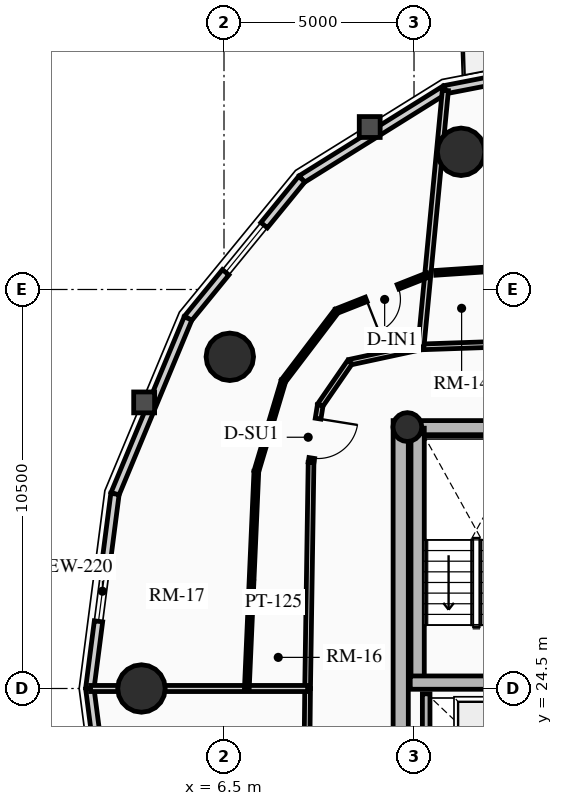
"""IFC4 building model, lengths in metres.
Left out: names, types, materials, properties, quantities, classifications, styles, units other than length and angle.
Written with IfcOpenShell. Run it as: python <this file> out.ifc"""

import sys

from ifc_helpers import new_model, si_unit, direction, frame, frame_2d, origin, origin_2d, place, context, subcontext, project, spatial, rectangle, circle, hollow_circle, extrude, source, transform, mapped, element, fill, save


model = new_model("IFC4")
c1 = context("Model", 3, precision=1e-05, world=origin(), true_north=direction((0.0, 1.0)))
c2 = subcontext(c1, "Body", "Model", "MODEL_VIEW")
j1 = project(units=[si_unit("LENGTHUNIT", "METRE"), si_unit("PLANEANGLEUNIT", "RADIAN")], contexts=[c1])
p1 = place(None, origin())
s1 = spatial("IfcSite", under=j1, at=p1, CompositionType="ELEMENT")
p2 = place(p1, origin())
s2 = spatial("IfcBuilding", under=s1, at=p2, CompositionType="ELEMENT")
p3 = place(p2, frame((0.0, 0.0, 180.7)))
s3 = spatial("IfcBuildingStorey", under=s2, at=p3, CompositionType="ELEMENT", Elevation=180.7)
p4 = place(p3, frame((11.15, 17.45, 0.0), z_axis=(0.0, 0.0, 1.0), x_axis=(0.0, 1.0, 0.0)))
e1 = element("IfcWall", 1, at=p4, inside=s3, PredefinedType="SHEAR", context=c2, shape_type="SweptSolid", body=[
    extrude(rectangle(XDim=14.1, YDim=0.4, at=frame_2d((7.05, 0.0))), origin(), (0.0, 0.0, 1.0), 2.91),
])
p5 = place(p3, frame((11.15, 31.35, 0.0), z_axis=(0.0, 0.0, 1.0), x_axis=(1.0, 0.0, 0.0)))
e2 = element("IfcWall", 2, at=p5, inside=s3, PredefinedType="SHEAR", context=c2, shape_type="SweptSolid", body=[
    extrude(rectangle(XDim=10.7, YDim=0.4, at=frame_2d((5.35, 0.0))), origin(), (0.0, 0.0, 1.0), 2.91),
])
m1 = source(origin(), c2, "Body", "SweptSolid", [
    extrude(rectangle(XDim=1.5, YDim=2.02, at=frame_2d((0.75, 1.01))), frame((0.0, 0.21, 0.0), z_axis=(0.0, -1.0, 0.0), x_axis=(1.0, 0.0, 0.0)), (0.0, 0.0, 1.0), 0.42),
])
p6 = place(p5, frame((4.6, 0.0, 0.0)))
e3 = element("IfcOpeningElement", 3, at=p6, cuts=e2, PredefinedType="OPENING", context=c2, shape_type="MappedRepresentation", body=[
    mapped(m1, transform((0.0, 0.0, 0.0), x_axis=(1.0, 0.0, 0.0), y_axis=(0.0, 1.0, 0.0), z_axis=(0.0, 0.0, 1.0), scale=1.0)),
])
p7 = place(p3, frame((11.595, 24.655, 0.0), z_axis=(0.0, 0.0, 1.0), x_axis=(0.0, 1.0, 0.0)))
e4 = element("IfcWall", 4, at=p7, inside=s3, PredefinedType="SHEAR", context=c2, shape_type="SweptSolid", body=[
    extrude(rectangle(XDim=6.695, YDim=0.35, at=frame_2d((3.348, 0.0))), origin(), (0.0, 0.0, 1.0), 2.91),
])
p8 = place(p3, frame((11.4, 24.655, 0.0), z_axis=(0.0, 0.0, 1.0), x_axis=(1.0, 0.0, 0.0)))
e5 = element("IfcWall", 5, at=p8, inside=s3, PredefinedType="SHEAR", context=c2, shape_type="SweptSolid", body=[
    extrude(rectangle(XDim=3.285, YDim=0.35, at=frame_2d((1.643, 0.0))), origin(), (0.0, 0.0, 1.0), 2.91),
])
p9 = place(p3, frame((11.325, 31.38, 0.0), z_axis=(0.0, 0.0, 1.0), x_axis=(1.0, 0.0, 0.0)))
e6 = element("IfcColumn", 6, at=p9, inside=s3, PredefinedType="COLUMN", context=c2, shape_type="SweptSolid", body=[
    extrude(hollow_circle(Radius=0.38, WallThickness=0.032, at=origin_2d()), origin(), (0.0, 0.0, 1.0), 2.91),
])
for number, where, z_axis, x_axis in (
    (7, (12.739, 38.623, 0.0), (0.0, 0.0, 1.0), (1.0, 0.0, 0.0)),
    (8, (6.653, 33.229, 0.0), (0.0, 0.0, 1.0), (1.0, 0.0, 0.0)),
    (9, (4.328, 24.5, 0.0), (0.0, 0.0, 1.0), (1.0, 0.0, 0.0)),
):
    element("IfcColumn", number, at=place(p3, frame(where, z_axis=z_axis, x_axis=x_axis)), inside=s3, PredefinedType="USERDEFINED", context=c2, shape_type="SweptSolid", body=[
        extrude(circle(Radius=0.625, at=origin_2d()), origin(), (0.0, 0.0, 1.0), 2.91),
    ])
p10 = place(p3, frame((12.319, 40.259, 0.0), z_axis=(0.0, 0.0, 1.0), x_axis=(0.981703883443, 0.190413983815, 0.0)))
e10 = element("IfcWall", 10, at=p10, inside=s3, PredefinedType="SOLIDWALL", context=c2, shape_type="SweptSolid", body=[
    extrude(rectangle(XDim=4.259, YDim=0.22, at=frame_2d((2.13, 0.0))), origin(), (0.0, 0.0, 1.0), 2.245),
])
m2 = source(origin(), c2, "Body", "SweptSolid", [
    extrude(rectangle(XDim=1.15, YDim=2.005, at=frame_2d((0.575, 1.002))), frame((0.0, 0.12, 0.0), z_axis=(0.0, -1.0, 0.0), x_axis=(1.0, 0.0, 0.0)), (0.0, 0.0, 1.0), 0.24),
])
p11 = place(p10, frame((1.555, 0.0, 0.0)))
e11 = element("IfcOpeningElement", 11, at=p11, cuts=e10, PredefinedType="OPENING", context=c2, shape_type="MappedRepresentation", body=[
    mapped(m2, transform((0.0, 0.0, 0.0), x_axis=(1.0, 0.0, 0.0), y_axis=(0.0, 1.0, 0.0), z_axis=(0.0, 0.0, 1.0), scale=1.0)),
])
p12 = place(p3, frame((8.547, 37.906, 0.0), z_axis=(0.0, 0.0, 1.0), x_axis=(0.848399108042, 0.529357113368, 0.0)))
e12 = element("IfcWall", 12, at=p12, inside=s3, PredefinedType="SOLIDWALL", context=c2, shape_type="SweptSolid", body=[
    extrude(rectangle(XDim=4.446, YDim=0.22, at=frame_2d((2.223, 0.0))), origin(), (0.0, 0.0, 1.0), 2.245),
])
p13 = place(p3, frame((5.553, 34.24, 0.0), z_axis=(0.0, 0.0, 1.0), x_axis=(0.632470615287, 0.774584353572, 0.0)))
e13 = element("IfcWall", 13, at=p13, inside=s3, PredefinedType="SOLIDWALL", context=c2, shape_type="SweptSolid", body=[
    extrude(rectangle(XDim=4.733, YDim=0.22, at=frame_2d((2.366, 0.0))), origin(), (0.0, 0.0, 1.0), 2.245),
])
m3 = source(origin(), c2, "Body", "SweptSolid", [
    extrude(rectangle(XDim=1.6, YDim=1.3, at=frame_2d((0.8, 0.65))), frame((0.0, 0.12, 0.0), z_axis=(0.0, -1.0, 0.0), x_axis=(1.0, 0.0, 0.0)), (0.0, 0.0, 1.0), 0.24),
])
p14 = place(p13, frame((1.566, 0.0, 0.65)))
e14 = element("IfcOpeningElement", 14, at=p14, cuts=e13, PredefinedType="OPENING", context=c2, shape_type="MappedRepresentation", body=[
    mapped(m3, transform((0.0, 0.0, 0.0), x_axis=(1.0, 0.0, 0.0), y_axis=(0.0, 1.0, 0.0), z_axis=(0.0, 0.0, 1.0), scale=1.0)),
])
p15 = place(p3, frame((3.631, 29.62, 0.0), z_axis=(0.0, 0.0, 1.0), x_axis=(0.384144094086, 0.923273152961, 0.0)))
e15 = element("IfcWall", 15, at=p15, inside=s3, PredefinedType="SOLIDWALL", context=c2, shape_type="SweptSolid", body=[
    extrude(rectangle(XDim=5.003, YDim=0.22, at=frame_2d((2.501, 0.0))), origin(), (0.0, 0.0, 1.0), 2.245),
])
p16 = place(p3, frame((2.969, 24.5, 0.0), z_axis=(0.0, 0.0, 1.0), x_axis=(0.128287912609, 0.991736966881, 0.0)))
e16 = element("IfcWall", 16, at=p16, inside=s3, PredefinedType="SOLIDWALL", context=c2, shape_type="SweptSolid", body=[
    extrude(rectangle(XDim=5.163, YDim=0.22, at=frame_2d((2.582, 0.0))), origin(), (0.0, 0.0, 1.0), 2.245),
])
p17 = place(p16, frame((1.782, 0.0, 0.65)))
e17 = element("IfcOpeningElement", 17, at=p17, cuts=e16, PredefinedType="OPENING", context=c2, shape_type="MappedRepresentation", body=[
    mapped(m3, transform((0.0, 0.0, 0.0), x_axis=(1.0, 0.0, 0.0), y_axis=(0.0, 1.0, 0.0), z_axis=(0.0, 0.0, 1.0), scale=1.0)),
])
p18 = place(p3, frame((3.631, 19.38, 0.0), z_axis=(0.0, 0.0, 1.0), x_axis=(-0.128287912609, 0.991736966881, 0.0)))
e18 = element("IfcWall", 18, at=p18, inside=s3, PredefinedType="SOLIDWALL", context=c2, shape_type="SweptSolid", body=[
    extrude(rectangle(XDim=5.163, YDim=0.22, at=frame_2d((2.582, 0.0))), origin(), (0.0, 0.0, 1.0), 2.245),
])
p19 = place(p3, frame((11.82, 21.92, 0.0), z_axis=(0.0, 0.0, 1.0), x_axis=(0.0, 1.0, 0.0)))
e19 = element("IfcWall", 19, at=p19, inside=s3, PredefinedType="SHEAR", context=c2, shape_type="SweptSolid", body=[
    extrude(rectangle(XDim=2.44, YDim=0.2, at=frame_2d((1.22, 0.0))), origin(), (0.0, 0.0, 1.0), 2.91),
])
p20 = place(p3, frame((18.123, 33.709, 0.0), z_axis=(0.0, 0.0, 1.0), x_axis=(-0.999417459976, -0.034128297572, 0.0)))
e20 = element("IfcWall", 20, at=p20, inside=s3, PredefinedType="PARTITIONING", context=c2, shape_type="SweptSolid", body=[
    extrude(rectangle(XDim=6.445, YDim=0.15, at=frame_2d((3.223, 0.0))), origin(), (0.0, 0.0, 1.0), 2.245),
])
p21 = place(p3, frame((11.681, 33.49, 0.0), z_axis=(0.0, 0.0, 1.0), x_axis=(-0.977628265995, -0.2103401377, 0.0)))
e21 = element("IfcWall", 21, at=p21, inside=s3, PredefinedType="PARTITIONING", context=c2, shape_type="SweptSolid", body=[
    extrude(rectangle(XDim=1.912, YDim=0.15, at=frame_2d((0.956, 0.0))), origin(), (0.0, 0.0, 1.0), 2.245),
])
p22 = place(p3, frame((9.812, 33.087, 0.0), z_axis=(0.0, 0.0, 1.0), x_axis=(-0.567811958729, -0.823158295545, 0.0)))
e22 = element("IfcWall", 22, at=p22, inside=s3, PredefinedType="PARTITIONING", context=c2, shape_type="SweptSolid", body=[
    extrude(rectangle(XDim=1.372, YDim=0.15, at=frame_2d((0.686, 0.0))), origin(), (0.0, 0.0, 1.0), 2.245),
])
p23 = place(p3, frame((9.033, 31.958, 0.0), z_axis=(0.0, 0.0, 1.0), x_axis=(-0.158344987388, -0.98738384885, 0.0)))
e23 = element("IfcWall", 23, at=p23, inside=s3, PredefinedType="PARTITIONING", context=c2, shape_type="SweptSolid", body=[
    extrude(rectangle(XDim=1.531, YDim=0.15, at=frame_2d((0.766, 0.0))), origin(), (0.0, 0.0, 1.0), 2.245),
])
m4 = source(origin(), c2, "Body", "SweptSolid", [
    extrude(rectangle(XDim=1.05, YDim=2.015, at=frame_2d((0.525, 1.007))), frame((0.0, 0.085, 0.0), z_axis=(0.0, -1.0, 0.0), x_axis=(1.0, 0.0, 0.0)), (0.0, 0.0, 1.0), 0.17),
])
p24 = place(p23, frame((0.361, 0.0, 0.0)))
e24 = element("IfcOpeningElement", 24, at=p24, cuts=e23, PredefinedType="OPENING", context=c2, shape_type="MappedRepresentation", body=[
    mapped(m4, transform((0.0, 0.0, 0.0), x_axis=(1.0, 0.0, 0.0), y_axis=(0.0, 1.0, 0.0), z_axis=(0.0, 0.0, 1.0), scale=1.0)),
])
p25 = place(p3, frame((8.791, 30.446, 0.0), z_axis=(0.0, 0.0, 1.0), x_axis=(-0.015230619426, -0.999884007389, 0.0)))
e25 = element("IfcWall", 25, at=p25, inside=s3, PredefinedType="PARTITIONING", context=c2, shape_type="SweptSolid", body=[
    extrude(rectangle(XDim=5.947, YDim=0.15, at=frame_2d((2.974, 0.0))), origin(), (0.0, 0.0, 1.0), 2.675),
])
p26 = place(p3, frame((8.7, 24.5, 0.0), z_axis=(0.0, 0.0, 1.0), x_axis=(-0.010507512335, -0.999944794568, 0.0)))
e26 = element("IfcWall", 26, at=p26, inside=s3, PredefinedType="PARTITIONING", context=c2, shape_type="SweptSolid", body=[
    extrude(rectangle(XDim=6.064, YDim=0.15, at=frame_2d((3.032, 0.0))), origin(), (0.0, 0.0, 1.0), 2.245),
])
p27 = place(p3, frame((11.681, 33.49, 0.0), z_axis=(0.0, 0.0, 1.0), x_axis=(0.094975594504, 0.995479601222, 0.0)))
e27 = element("IfcWall", 27, at=p27, inside=s3, PredefinedType="PARTITIONING", context=c2, shape_type="SweptSolid", body=[
    extrude(rectangle(XDim=6.781, YDim=0.16, at=frame_2d((3.391, 0.0))), origin(), (0.0, 0.0, 1.0), 2.245),
])
p28 = place(p3, frame((8.7, 24.5, 0.0), z_axis=(0.0, 0.0, 1.0), x_axis=(-1.0, 0.0, 0.0)))
e28 = element("IfcWall", 28, at=p28, inside=s3, PredefinedType="PARTITIONING", context=c2, shape_type="SweptSolid", body=[
    extrude(rectangle(XDim=5.711, YDim=0.16, at=frame_2d((2.855, 0.0))), origin(), (0.0, 0.0, 1.0), 2.245),
])
p29 = place(p3, frame((14.848, 35.625, 0.0), z_axis=(0.0, 0.0, 1.0), x_axis=(-0.997750908336, -0.067030775874, 0.0)))
e29 = element("IfcWall", 29, at=p29, inside=s3, PredefinedType="PARTITIONING", context=c2, shape_type="SweptSolid", body=[
    extrude(rectangle(XDim=2.786, YDim=0.125, at=frame_2d((1.393, 0.0))), origin(), (0.0, 0.0, 1.0), 2.245),
])
m5 = source(origin(), c2, "Body", "SweptSolid", [
    extrude(rectangle(XDim=0.9, YDim=2.005, at=frame_2d((0.45, 1.002))), frame((0.0, 0.073, 0.0), z_axis=(0.0, -1.0, 0.0), x_axis=(1.0, 0.0, 0.0)), (0.0, 0.0, 1.0), 0.145),
])
p30 = place(p29, frame((0.12, 0.0, 0.0)))
e30 = element("IfcOpeningElement", 30, at=p30, cuts=e29, PredefinedType="OPENING", context=c2, shape_type="MappedRepresentation", body=[
    mapped(m5, transform((0.0, 0.0, 0.0), x_axis=(1.0, 0.0, 0.0), y_axis=(0.0, 1.0, 0.0), z_axis=(0.0, 0.0, 1.0), scale=1.0)),
])
p31 = place(p3, frame((11.861, 35.38, 0.0), z_axis=(0.0, 0.0, 1.0), x_axis=(-0.930124609977, -0.367244074037, 0.0)))
e31 = element("IfcWall", 31, at=p31, inside=s3, PredefinedType="PARTITIONING", context=c2, shape_type="SweptSolid", body=[
    extrude(rectangle(XDim=2.581, YDim=0.125, at=frame_2d((1.291, 0.0))), origin(), (0.0, 0.0, 1.0), 2.245),
])
p32 = place(p31, frame((0.84, 0.0, 0.0)))
e32 = element("IfcOpeningElement", 32, at=p32, cuts=e31, PredefinedType="OPENING", context=c2, shape_type="MappedRepresentation", body=[
    mapped(m5, transform((0.0, 0.0, 0.0), x_axis=(1.0, 0.0, 0.0), y_axis=(0.0, 1.0, 0.0), z_axis=(0.0, 0.0, 1.0), scale=1.0)),
])
p33 = place(p3, frame((9.461, 34.432, 0.0), z_axis=(0.0, 0.0, 1.0), x_axis=(-0.605297668278, -0.795999204005, 0.0)))
e33 = element("IfcWall", 33, at=p33, inside=s3, PredefinedType="PARTITIONING", context=c2, shape_type="SweptSolid", body=[
    extrude(rectangle(XDim=2.31, YDim=0.125, at=frame_2d((1.155, 0.0))), origin(), (0.0, 0.0, 1.0), 2.245),
])
p34 = place(p3, frame((8.063, 32.594, 0.0), z_axis=(0.0, 0.0, 1.0), x_axis=(-0.286473203627, -0.958088254601, 0.0)))
e34 = element("IfcWall", 34, at=p34, inside=s3, PredefinedType="PARTITIONING", context=c2, shape_type="SweptSolid", body=[
    extrude(rectangle(XDim=2.484, YDim=0.125, at=frame_2d((1.242, 0.0))), origin(), (0.0, 0.0, 1.0), 2.245),
])
p35 = place(p3, frame((7.351, 30.213, 0.0), z_axis=(0.0, 0.0, 1.0), x_axis=(-0.043800331293, -0.999040304982, 0.0)))
e35 = element("IfcWall", 35, at=p35, inside=s3, PredefinedType="PARTITIONING", context=c2, shape_type="SweptSolid", body=[
    extrude(rectangle(XDim=5.719, YDim=0.125, at=frame_2d((2.859, 0.0))), origin(), (0.0, 0.0, 1.0), 2.675),
])
m6 = source(origin(), c2, "Body", "SweptSolid", [
    extrude(rectangle(XDim=1.6, YDim=1.3, at=frame_2d((0.8, 0.65))), frame((0.0, 0.03, 0.0), z_axis=(0.0, -1.0, 0.0), x_axis=(1.0, 0.0, 0.0)), (0.0, 0.0, 1.0), 0.06),
])
p36 = place(p14, origin())
e36 = element("IfcWindow", 36, at=p36, inside=s3, PartitioningType="SINGLE_PANEL", PredefinedType="WINDOW", context=c2, shape_type="MappedRepresentation", body=[
    mapped(m6, transform((0.0, 0.0, 0.0), x_axis=(1.0, 0.0, 0.0), y_axis=(0.0, 1.0, 0.0), z_axis=(0.0, 0.0, 1.0), scale=1.0)),
])
fill(e14, e36)
p37 = place(p17, origin())
e37 = element("IfcWindow", 37, at=p37, inside=s3, PartitioningType="SINGLE_PANEL", PredefinedType="WINDOW", context=c2, shape_type="MappedRepresentation", body=[
    mapped(m6, transform((0.0, 0.0, 0.0), x_axis=(1.0, 0.0, 0.0), y_axis=(0.0, 1.0, 0.0), z_axis=(0.0, 0.0, 1.0), scale=1.0)),
])
fill(e17, e37)
m7 = source(origin(), c2, "Body", "SweptSolid", [
    extrude(rectangle(XDim=1.05, YDim=2.015, at=frame_2d((0.525, 1.007))), frame((0.0, 0.025, 0.0), z_axis=(0.0, -1.0, 0.0), x_axis=(1.0, 0.0, 0.0)), (0.0, 0.0, 1.0), 0.05),
])
p38 = place(p24, origin())
e38 = element("IfcDoor", 38, at=p38, inside=s3, OperationType="SINGLE_SWING_LEFT", PredefinedType="DOOR", context=c2, shape_type="MappedRepresentation", body=[
    mapped(m7, transform((0.0, 0.0, 0.0), x_axis=(1.0, 0.0, 0.0), y_axis=(0.0, 1.0, 0.0), z_axis=(0.0, 0.0, 1.0), scale=1.0)),
])
fill(e24, e38)
m8 = source(origin(), c2, "Body", "SweptSolid", [
    extrude(rectangle(XDim=0.9, YDim=2.005, at=frame_2d((0.45, 1.002))), frame((0.0, 0.025, 0.0), z_axis=(0.0, -1.0, 0.0), x_axis=(1.0, 0.0, 0.0)), (0.0, 0.0, 1.0), 0.05),
])
p39 = place(p32, origin())
e39 = element("IfcDoor", 39, at=p39, inside=s3, OperationType="SINGLE_SWING_RIGHT", PredefinedType="DOOR", context=c2, shape_type="MappedRepresentation", body=[
    mapped(m8, transform((0.0, 0.0, 0.0), x_axis=(1.0, 0.0, 0.0), y_axis=(0.0, 1.0, 0.0), z_axis=(0.0, 0.0, 1.0), scale=1.0)),
])
fill(e32, e39)
save(model, sys.argv[1])
